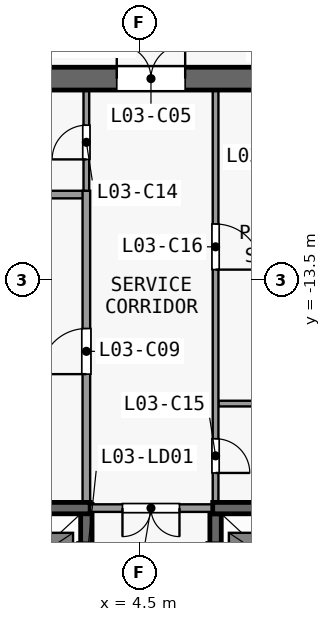
"""IFC4 building model, lengths in metres.
Left out: names, types, materials, properties, quantities, classifications, styles, units other than length and angle.
Written with IfcOpenShell. Run it as: python <this file> out.ifc"""

import sys

from ifc_helpers import new_model, si_unit, direction, frame, frame_2d, origin, place, context, subcontext, project, spatial, rectangle, extrude, element, fill, save


model = new_model("IFC4")
c1 = context("Model", 3, precision=1e-05, world=origin(), true_north=direction((0.0, 1.0)))
c2 = subcontext(c1, "Body", "Model", "MODEL_VIEW")
j1 = project(units=[si_unit("LENGTHUNIT", "METRE"), si_unit("PLANEANGLEUNIT", "RADIAN")], contexts=[c1])
p1 = place(None, origin())
s1 = spatial("IfcSite", under=j1, at=p1, CompositionType="ELEMENT")
p2 = place(p1, origin())
s2 = spatial("IfcBuilding", under=s1, at=p2, CompositionType="ELEMENT")
p3 = place(p2, frame((0.0, 0.0, 18.5)))
s3 = spatial("IfcBuildingStorey", under=s2, at=p3, CompositionType="ELEMENT", Elevation=18.5)
p4 = place(p3, frame((-13.5, -8.2, 0.0), z_axis=(0.0, 0.0, 1.0), x_axis=(1.0, 0.0, 0.0)))
e1 = element("IfcWall", 1, at=p4, inside=s3, PredefinedType="SHEAR", context=c2, shape_type="SweptSolid", body=[
    extrude(rectangle(XDim=27.0, YDim=0.6, at=frame_2d((13.5, 0.0))), origin(), (0.0, 0.0, 1.0), 4.65),
])
p5 = place(p4, frame((7.8, 0.0, 0.0)))
e2 = element("IfcOpeningElement", 2, at=p5, cuts=e1, PredefinedType="OPENING", context=c2, shape_type="SweptSolid", body=[
    extrude(rectangle(XDim=1.8, YDim=2.1, at=frame_2d((0.9, 1.05))), frame((0.0, 0.31, 0.0), z_axis=(0.0, -1.0, 0.0), x_axis=(1.0, 0.0, 0.0)), (0.0, 0.0, 1.0), 0.62),
])
p6 = place(p4, frame((17.4, 0.0, 0.0)))
e3 = element("IfcOpeningElement", 3, at=p6, cuts=e1, PredefinedType="OPENING", context=c2, shape_type="SweptSolid", body=[
    extrude(rectangle(XDim=1.8, YDim=2.1, at=frame_2d((0.9, 1.05))), frame((0.0, 0.31, 0.0), z_axis=(0.0, -1.0, 0.0), x_axis=(1.0, 0.0, 0.0)), (0.0, 0.0, 1.0), 0.62),
])
p7 = place(p4, frame((2.725, 0.0, 0.0)))
e4 = element("IfcOpeningElement", 4, at=p7, cuts=e1, PredefinedType="OPENING", context=c2, shape_type="SweptSolid", body=[
    extrude(rectangle(XDim=0.9, YDim=2.1, at=frame_2d((0.45, 1.05))), frame((0.0, 0.31, 0.0), z_axis=(0.0, -1.0, 0.0), x_axis=(1.0, 0.0, 0.0)), (0.0, 0.0, 1.0), 0.62),
])
p8 = place(p4, frame((23.375, 0.0, 0.0)))
e5 = element("IfcOpeningElement", 5, at=p8, cuts=e1, PredefinedType="OPENING", context=c2, shape_type="SweptSolid", body=[
    extrude(rectangle(XDim=0.9, YDim=2.1, at=frame_2d((0.45, 1.05))), frame((0.0, 0.31, 0.0), z_axis=(0.0, -1.0, 0.0), x_axis=(1.0, 0.0, 0.0)), (0.0, 0.0, 1.0), 0.62),
])
p9 = place(p3, frame((0.15, -19.5, 0.0), z_axis=(0.0, 0.0, 1.0), x_axis=(1.0, 0.0, 0.0)))
e6 = element("IfcWall", 6, at=p9, inside=s3, PredefinedType="SHEAR", context=c2, shape_type="SweptSolid", body=[
    extrude(rectangle(XDim=3.05, YDim=0.3, at=frame_2d((1.525, 0.0))), origin(), (0.0, 0.0, 1.0), 4.65),
])
p10 = place(p3, frame((6.575, -19.5, 0.0), z_axis=(0.0, 0.0, 1.0), x_axis=(-1.0, 0.0, 0.0)))
e7 = element("IfcWall", 7, at=p10, inside=s3, PredefinedType="PARTITIONING", context=c2, shape_type="SweptSolid", body=[
    extrude(rectangle(XDim=3.375, YDim=0.2, at=frame_2d((1.688, 0.0))), origin(), (0.0, 0.0, 1.0), 4.65),
])
p11 = place(p10, frame((1.025, 0.0, 0.0)))
e8 = element("IfcOpeningElement", 8, at=p11, cuts=e7, PredefinedType="OPENING", context=c2, shape_type="SweptSolid", body=[
    extrude(rectangle(XDim=1.5, YDim=2.1, at=frame_2d((0.75, 1.05))), frame((0.0, 0.11, 0.0), z_axis=(0.0, -1.0, 0.0), x_axis=(1.0, 0.0, 0.0)), (0.0, 0.0, 1.0), 0.22),
])
p12 = place(p3, frame((6.425, -19.5, 0.0), z_axis=(0.0, 0.0, 1.0), x_axis=(1.0, 0.0, 0.0)))
e9 = element("IfcWall", 9, at=p12, inside=s3, PredefinedType="SHEAR", context=c2, shape_type="SweptSolid", body=[
    extrude(rectangle(XDim=3.025, YDim=0.3, at=frame_2d((1.512, 0.0))), origin(), (0.0, 0.0, 1.0), 4.65),
])
p13 = place(p3, frame((6.575, -16.75, 0.0), z_axis=(0.0, 0.0, 1.0), x_axis=(1.0, 0.0, 0.0)))
e10 = element("IfcWall", 10, at=p13, inside=s3, PredefinedType="PARTITIONING", context=c2, shape_type="SweptSolid", body=[
    extrude(rectangle(XDim=2.925, YDim=0.15, at=frame_2d((1.462, 0.0))), origin(), (0.0, 0.0, 1.0), 4.65),
])
p14 = place(p3, frame((0.15, -11.25, 0.0), z_axis=(0.0, 0.0, 1.0), x_axis=(1.0, 0.0, 0.0)))
e11 = element("IfcWall", 11, at=p14, inside=s3, PredefinedType="PARTITIONING", context=c2, shape_type="SweptSolid", body=[
    extrude(rectangle(XDim=3.025, YDim=0.2, at=frame_2d((1.513, 0.0))), origin(), (0.0, 0.0, 1.0), 4.65),
])
p15 = place(p3, frame((3.1, -22.25, 0.0), z_axis=(0.0, 0.0, 1.0), x_axis=(0.0, 1.0, 0.0)))
e12 = element("IfcWall", 12, at=p15, inside=s3, PredefinedType="SHEAR", context=c2, shape_type="SweptSolid", body=[
    extrude(rectangle(XDim=2.85, YDim=0.3, at=frame_2d((1.425, 0.0))), origin(), (0.0, 0.0, 1.0), 4.65),
])
p16 = place(p15, frame((0.75, 0.0, 0.0)))
e13 = element("IfcOpeningElement", 13, at=p16, cuts=e12, PredefinedType="OPENING", context=c2, shape_type="SweptSolid", body=[
    extrude(rectangle(XDim=1.1, YDim=2.1, at=frame_2d((0.55, 1.05))), frame((0.0, 0.16, 0.0), z_axis=(0.0, -1.0, 0.0), x_axis=(1.0, 0.0, 0.0)), (0.0, 0.0, 1.0), 0.32),
])
p17 = place(p3, frame((3.1, -19.6, 0.0), z_axis=(0.0, 0.0, 1.0), x_axis=(0.0, 1.0, 0.0)))
e14 = element("IfcWall", 14, at=p17, inside=s3, PredefinedType="PARTITIONING", context=c2, shape_type="SweptSolid", body=[
    extrude(rectangle(XDim=8.45, YDim=0.2, at=frame_2d((4.225, 0.0))), origin(), (0.0, 0.0, 1.0), 4.65),
])
p18 = place(p17, frame((3.625, 0.0, 0.0)))
e15 = element("IfcOpeningElement", 15, at=p18, cuts=e14, PredefinedType="OPENING", context=c2, shape_type="SweptSolid", body=[
    extrude(rectangle(XDim=1.2, YDim=2.1, at=frame_2d((0.6, 1.05))), frame((0.0, 0.11, 0.0), z_axis=(0.0, -1.0, 0.0), x_axis=(1.0, 0.0, 0.0)), (0.0, 0.0, 1.0), 0.22),
])
p19 = place(p3, frame((3.1, -11.15, 0.0), z_axis=(0.0, 0.0, 1.0), x_axis=(0.0, 1.0, 0.0)))
e16 = element("IfcWall", 16, at=p19, inside=s3, PredefinedType="PARTITIONING", context=c2, shape_type="SweptSolid", body=[
    extrude(rectangle(XDim=2.65, YDim=0.15, at=frame_2d((1.325, 0.0))), origin(), (0.0, 0.0, 1.0), 4.65),
])
p20 = place(p19, frame((0.825, 0.0, 0.0)))
e17 = element("IfcOpeningElement", 17, at=p20, cuts=e16, PredefinedType="OPENING", context=c2, shape_type="SweptSolid", body=[
    extrude(rectangle(XDim=0.9, YDim=2.1, at=frame_2d((0.45, 1.05))), frame((0.0, 0.085, 0.0), z_axis=(0.0, -1.0, 0.0), x_axis=(1.0, 0.0, 0.0)), (0.0, 0.0, 1.0), 0.17),
])
p21 = place(p3, frame((6.5, -22.25, 0.0), z_axis=(0.0, 0.0, 1.0), x_axis=(0.0, 1.0, 0.0)))
e18 = element("IfcWall", 18, at=p21, inside=s3, PredefinedType="SHEAR", context=c2, shape_type="SweptSolid", body=[
    extrude(rectangle(XDim=2.6, YDim=0.3, at=frame_2d((1.3, 0.0))), origin(), (0.0, 0.0, 1.0), 4.65),
])
p22 = place(p21, frame((0.75, 0.0, 0.0)))
e19 = element("IfcOpeningElement", 19, at=p22, cuts=e18, PredefinedType="OPENING", context=c2, shape_type="SweptSolid", body=[
    extrude(rectangle(XDim=1.1, YDim=2.1, at=frame_2d((0.55, 1.05))), frame((0.0, 0.16, 0.0), z_axis=(0.0, -1.0, 0.0), x_axis=(1.0, 0.0, 0.0)), (0.0, 0.0, 1.0), 0.32),
])
p23 = place(p3, frame((6.5, -8.5, 0.0), z_axis=(0.0, 0.0, 1.0), x_axis=(0.0, -1.0, 0.0)))
e20 = element("IfcWall", 20, at=p23, inside=s3, PredefinedType="PARTITIONING", context=c2, shape_type="SweptSolid", body=[
    extrude(rectangle(XDim=10.85, YDim=0.15, at=frame_2d((5.425, 0.0))), origin(), (0.0, 0.0, 1.0), 4.65),
])
p24 = place(p23, frame((9.175, 0.0, 0.0)))
e21 = element("IfcOpeningElement", 21, at=p24, cuts=e20, PredefinedType="OPENING", context=c2, shape_type="SweptSolid", body=[
    extrude(rectangle(XDim=0.9, YDim=2.1, at=frame_2d((0.45, 1.05))), frame((0.0, 0.085, 0.0), z_axis=(0.0, -1.0, 0.0), x_axis=(1.0, 0.0, 0.0)), (0.0, 0.0, 1.0), 0.17),
])
p25 = place(p23, frame((3.525, 0.0, 0.0)))
e22 = element("IfcOpeningElement", 22, at=p25, cuts=e20, PredefinedType="OPENING", context=c2, shape_type="SweptSolid", body=[
    extrude(rectangle(XDim=1.2, YDim=2.1, at=frame_2d((0.6, 1.05))), frame((0.0, 0.085, 0.0), z_axis=(0.0, -1.0, 0.0), x_axis=(1.0, 0.0, 0.0)), (0.0, 0.0, 1.0), 0.17),
])
p26 = place(p11, origin())
e23 = element("IfcDoor", 23, at=p26, inside=s3, OperationType="DOUBLE_DOOR_SINGLE_SWING", PredefinedType="DOOR", context=c2, shape_type="SweptSolid", body=[
    extrude(rectangle(XDim=1.5, YDim=2.1, at=frame_2d((0.75, 1.05))), frame((0.0, 0.025, 0.0), z_axis=(0.0, -1.0, 0.0), x_axis=(1.0, 0.0, 0.0)), (0.0, 0.0, 1.0), 0.05),
])
fill(e8, e23)
p27 = place(p6, origin())
e24 = element("IfcDoor", 24, at=p27, inside=s3, OperationType="DOUBLE_DOOR_SINGLE_SWING", PredefinedType="DOOR", context=c2, shape_type="SweptSolid", body=[
    extrude(rectangle(XDim=1.8, YDim=2.1, at=frame_2d((0.9, 1.05))), frame((0.0, 0.025, 0.0), z_axis=(0.0, -1.0, 0.0), x_axis=(1.0, 0.0, 0.0)), (0.0, 0.0, 1.0), 0.05),
])
fill(e3, e24)
p28 = place(p18, origin())
e25 = element("IfcDoor", 25, at=p28, inside=s3, OperationType="SINGLE_SWING_LEFT", PredefinedType="DOOR", context=c2, shape_type="SweptSolid", body=[
    extrude(rectangle(XDim=1.2, YDim=2.1, at=frame_2d((0.6, 1.05))), frame((0.0, 0.025, 0.0), z_axis=(0.0, -1.0, 0.0), x_axis=(1.0, 0.0, 0.0)), (0.0, 0.0, 1.0), 0.05),
])
fill(e15, e25)
p29 = place(p20, origin())
e26 = element("IfcDoor", 26, at=p29, inside=s3, OperationType="SINGLE_SWING_LEFT", PredefinedType="DOOR", context=c2, shape_type="SweptSolid", body=[
    extrude(rectangle(XDim=0.9, YDim=2.1, at=frame_2d((0.45, 1.05))), frame((0.0, 0.025, 0.0), z_axis=(0.0, -1.0, 0.0), x_axis=(1.0, 0.0, 0.0)), (0.0, 0.0, 1.0), 0.05),
])
fill(e17, e26)
p30 = place(p24, origin())
e27 = element("IfcDoor", 27, at=p30, inside=s3, OperationType="SINGLE_SWING_RIGHT", PredefinedType="DOOR", context=c2, shape_type="SweptSolid", body=[
    extrude(rectangle(XDim=0.9, YDim=2.1, at=frame_2d((0.45, 1.05))), frame((0.0, 0.025, 0.0), z_axis=(0.0, -1.0, 0.0), x_axis=(1.0, 0.0, 0.0)), (0.0, 0.0, 1.0), 0.05),
])
fill(e21, e27)
p31 = place(p25, origin())
e28 = element("IfcDoor", 28, at=p31, inside=s3, OperationType="SINGLE_SWING_RIGHT", PredefinedType="DOOR", context=c2, shape_type="SweptSolid", body=[
    extrude(rectangle(XDim=1.2, YDim=2.1, at=frame_2d((0.6, 1.05))), frame((0.0, 0.025, 0.0), z_axis=(0.0, -1.0, 0.0), x_axis=(1.0, 0.0, 0.0)), (0.0, 0.0, 1.0), 0.05),
])
fill(e22, e28)
save(model, sys.argv[1])
